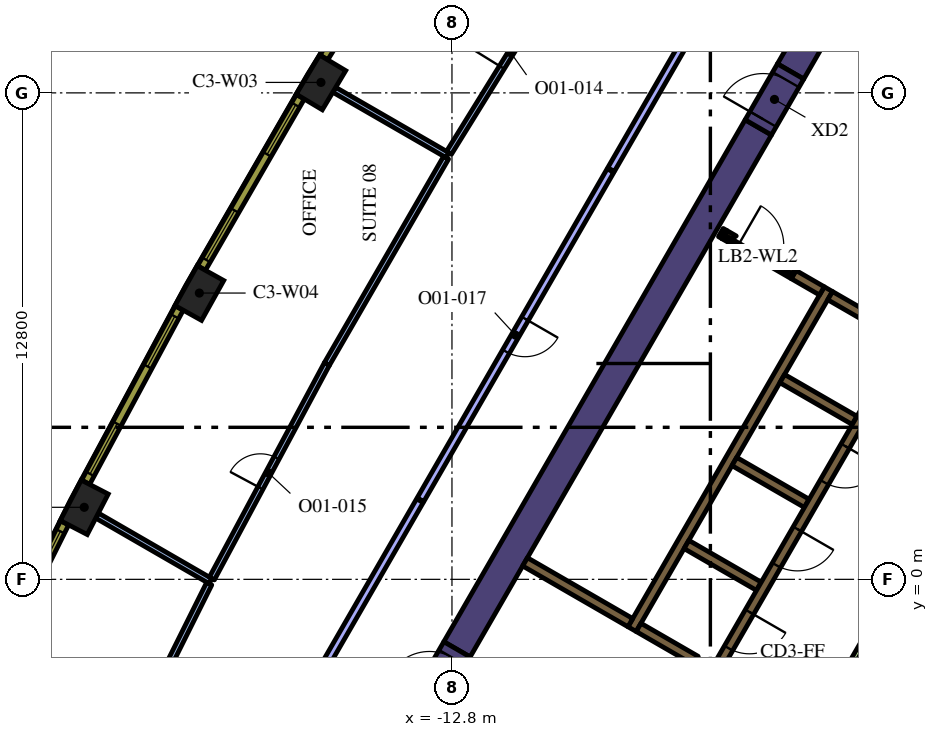
"""IFC4 building model, lengths in metres.
Left out: names, types, materials, properties, quantities, classifications, styles, units other than length and angle.
Written with IfcOpenShell. Run it as: python <this file> out.ifc"""

import sys

from ifc_helpers import new_model, si_unit, direction, frame, frame_2d, origin, origin_2d, place, context, subcontext, project, spatial, polyline, rectangle, outline, extrude, element, fill, save


model = new_model("IFC4")
c1 = context("Model", 3, precision=1e-05, world=origin(), true_north=direction((0.0, 1.0)))
c2 = subcontext(c1, "Body", "Model", "MODEL_VIEW")
j1 = project(units=[si_unit("LENGTHUNIT", "METRE"), si_unit("PLANEANGLEUNIT", "RADIAN")], contexts=[c1])
p1 = place(None, origin())
s1 = spatial("IfcSite", under=j1, at=p1, CompositionType="ELEMENT")
p2 = place(p1, origin())
s2 = spatial("IfcBuilding", under=s1, at=p2, CompositionType="ELEMENT")
p3 = place(p2, frame((0.0, 0.0, 150.0)))
s3 = spatial("IfcBuildingStorey", under=s2, at=p3, CompositionType="ELEMENT", Elevation=150.0)
for number, where, z_axis, x_axis in (
    (1, (-16.247, 13.075, 0.0), (0.0, 0.0, 1.0), (-0.513, -0.858, 0.0)),
    (2, (-19.447, 7.533, 0.0), (0.0, 0.0, 1.0), (-0.487, -0.874, 0.0)),
    (3, (-22.476, 1.896, 0.0), (0.0, 0.0, 1.0), (-0.46, -0.888, 0.0)),
):
    element("IfcColumn", number, at=place(p3, frame(where, z_axis=z_axis, x_axis=x_axis)), inside=s3, PredefinedType="COLUMN", context=c2, shape_type="SweptSolid", body=[
        extrude(rectangle(XDim=1.2, YDim=0.8, at=origin_2d()), origin(), (0.0, 0.0, 1.0), 4.2),
    ])
p4 = place(p3, frame((-2.477, 15.81, 0.0), z_axis=(0.0, 0.0, 1.0), x_axis=(-0.499969377405, -0.866043083026, 0.0)))
e4 = element("IfcWall", 4, at=p4, inside=s3, PredefinedType="SOLIDWALL", context=c2, shape_type="SweptSolid", body=[
    extrude(rectangle(XDim=2.824, YDim=0.8, at=frame_2d((1.412, 0.0))), origin(), (0.0, 0.0, 1.0), 4.2),
])
p5 = place(p3, frame((-12.668, -1.842, 0.0), z_axis=(0.0, 0.0, 1.0), x_axis=(0.500003640647, 0.866023301845, 0.0)))
e5 = element("IfcWall", 5, at=p5, inside=s3, PredefinedType="SOLIDWALL", context=c2, shape_type="SweptSolid", body=[
    extrude(rectangle(XDim=15.858, YDim=0.8, at=frame_2d((7.929, 0.0))), origin(), (0.0, 0.0, 1.0), 4.2),
])
p6 = place(p3, frame((-8.06, -1.311, 0.0), z_axis=(0.0, 0.0, 1.0), x_axis=(0.50000273126, 0.866023826885, 0.0)))
e6 = element("IfcWall", 6, at=p6, inside=s3, PredefinedType="SOLIDWALL", context=c2, shape_type="SweptSolid", body=[
    extrude(rectangle(XDim=10.33, YDim=0.25, at=frame_2d((5.165, 0.0))), origin(), (0.0, 0.0, 1.0), 4.2),
])
p7 = place(p3, origin())
e7 = element("IfcWall", 7, at=p7, inside=s3, PredefinedType="SOLIDWALL", context=c2, shape_type="SweptSolid", body=[
    extrude(outline(polyline([(-2.912, 7.356), (-2.787, 7.573), (-1.232, 6.675), (-1.303, 6.675), (-1.304, 6.675), (-1.304, 6.675), (-1.304, 6.525), (-1.304, 6.525), (-1.303, 6.525), (-0.971, 6.525), (-0.665, 6.348), (-0.79, 6.132), (-1.007, 6.257), (-1.007, 6.257), (-2.912, 7.356)])), origin(), (0.0, 0.0, 1.0), 4.2),
])
for number, where, z_axis, x_axis in (
    (8, (-2.204, 4.182, 0.0), (0.0, 0.0, 1.0), (-0.866, 0.5, 0.0)),
    (9, (-5.369, 3.1, 0.0), (0.0, 0.0, 1.0), (0.866, -0.5, 0.0)),
    (10, (-4.724, -0.182, 0.0), (0.0, 0.0, 1.0), (-0.866, 0.5, 0.0)),
):
    element("IfcWall", number, at=place(p3, frame(where, z_axis=z_axis, x_axis=x_axis)), inside=s3, PredefinedType="SOLIDWALL", context=c2, shape_type="SweptSolid", body=[
        extrude(rectangle(XDim=2.2, YDim=0.25, at=frame_2d((1.1, 0.0))), origin(), (0.0, 0.0, 1.0), 4.2),
    ])
p8 = place(p3, frame((-7.889, -1.265, 0.0), z_axis=(0.0, 0.0, 1.0), x_axis=(0.865986741702, -0.500066958712, 0.0)))
e11 = element("IfcWall", 11, at=p8, inside=s3, PredefinedType="SOLIDWALL", context=c2, shape_type="SweptSolid", body=[
    extrude(rectangle(XDim=1.738, YDim=0.25, at=frame_2d((0.869, 0.0))), origin(), (0.0, 0.0, 1.0), 4.2),
])
p9 = place(p3, frame((-8.106, -1.14, 0.0), z_axis=(0.0, 0.0, 1.0), x_axis=(-0.866008981251, 0.500028443584, 0.0)))
e12 = element("IfcWall", 12, at=p9, inside=s3, PredefinedType="SOLIDWALL", context=c2, shape_type="SweptSolid", body=[
    extrude(rectangle(XDim=3.2, YDim=0.25, at=frame_2d((1.6, 0.0))), origin(), (0.0, 0.0, 1.0), 4.2),
])
p10 = place(p3, frame((-5.725, 9.125, 0.0), z_axis=(0.0, 0.0, 1.0), x_axis=(0.866185586049, -0.49972245349, 0.0)))
e13 = element("IfcWall", 13, at=p10, inside=s3, PredefinedType="SOLIDWALL", context=c2, shape_type="SweptSolid", body=[
    extrude(rectangle(XDim=0.11, YDim=0.25, at=frame_2d((0.055, 0.0))), origin(), (0.0, 0.0, 1.0), 4.2),
])
p11 = place(p3, frame((-3.066, 7.59, 0.0), z_axis=(0.0, 0.0, 1.0), x_axis=(-0.866081358704, 0.49990307071, 0.0)))
e14 = element("IfcWall", 14, at=p11, inside=s3, PredefinedType="SOLIDWALL", context=c2, shape_type="SweptSolid", body=[
    extrude(rectangle(XDim=0.858, YDim=0.25, at=frame_2d((0.429, 0.0))), origin(), (0.0, 0.0, 1.0), 4.2),
])
e15 = element("IfcWall", 15, at=p7, inside=s3, PredefinedType="SOLIDWALL", context=c2, shape_type="SweptSolid", body=[
    extrude(outline(polyline([(-3.748, 8.128), (-3.813, 8.015), (-4.027, 8.139), (-4.017, 8.156), (-4.008, 8.173), (-4.0, 8.192), (-3.995, 8.21), (-3.991, 8.23), (-3.99, 8.25), (-3.99, 8.268), (-3.748, 8.128)])), origin(), (0.0, 0.0, 1.0), 4.2),
])
e16 = element("IfcWall", 16, at=p7, inside=s3, PredefinedType="SOLIDWALL", context=c2, shape_type="SweptSolid", body=[
    extrude(outline(polyline([(-5.689, 8.96), (-5.69, 8.961), (-5.565, 9.177), (-5.319, 9.035), (-5.335, 9.026), (-5.351, 9.015), (-5.366, 9.002), (-5.379, 8.988), (-5.392, 8.972), (-5.402, 8.956), (-5.412, 8.939), (-5.629, 9.064), (-5.629, 9.064), (-5.689, 8.96)])), origin(), (0.0, 0.0, 1.0), 4.2),
])
p12 = place(p3, frame((-3.147, -3.718, 0.0), z_axis=(0.0, 0.0, 1.0), x_axis=(0.500010131483, 0.866019554291, 0.0)))
e17 = element("IfcWall", 17, at=p12, inside=s3, PredefinedType="PARTITIONING", context=c2, shape_type="SweptSolid", body=[
    extrude(rectangle(XDim=3.894, YDim=0.15, at=frame_2d((1.947, 0.0))), origin(), (0.0, 0.0, 1.0), 3.15),
])
p13 = place(p3, frame((-0.898, 6.194, 0.0), z_axis=(0.0, 0.0, 1.0), x_axis=(-0.499996202215, -0.866027596426, 0.0)))
e18 = element("IfcWall", 18, at=p13, inside=s3, PredefinedType="SOLIDWALL", context=c2, shape_type="SweptSolid", body=[
    extrude(rectangle(XDim=9.83, YDim=0.25, at=frame_2d((4.915, 0.0))), origin(), (0.0, 0.0, 1.0), 4.2),
])
p14 = place(p13, frame((0.585, 0.0, 0.0)))
e19 = element("IfcOpeningElement", 19, at=p14, cuts=e18, PredefinedType="OPENING", context=c2, shape_type="SweptSolid", body=[
    extrude(rectangle(XDim=1.1, YDim=2.1, at=frame_2d((0.55, 1.05))), frame((0.0, 0.135, 0.0), z_axis=(0.0, -1.0, 0.0), x_axis=(1.0, 0.0, 0.0)), (0.0, 0.0, 1.0), 0.27),
])
p15 = place(p13, frame((3.105, 0.0, 0.0)))
e20 = element("IfcOpeningElement", 20, at=p15, cuts=e18, PredefinedType="OPENING", context=c2, shape_type="SweptSolid", body=[
    extrude(rectangle(XDim=1.1, YDim=2.1, at=frame_2d((0.55, 1.05))), frame((0.0, 0.135, 0.0), z_axis=(0.0, -1.0, 0.0), x_axis=(1.0, 0.0, 0.0)), (0.0, 0.0, 1.0), 0.27),
])
p16 = place(p13, frame((5.625, 0.0, 0.0)))
e21 = element("IfcOpeningElement", 21, at=p16, cuts=e18, PredefinedType="OPENING", context=c2, shape_type="SweptSolid", body=[
    extrude(rectangle(XDim=1.1, YDim=2.1, at=frame_2d((0.55, 1.05))), frame((0.0, 0.135, 0.0), z_axis=(0.0, -1.0, 0.0), x_axis=(1.0, 0.0, 0.0)), (0.0, 0.0, 1.0), 0.27),
])
p17 = place(p13, frame((8.145, 0.0, 0.0)))
e22 = element("IfcOpeningElement", 22, at=p17, cuts=e18, PredefinedType="OPENING", context=c2, shape_type="SweptSolid", body=[
    extrude(rectangle(XDim=1.1, YDim=2.1, at=frame_2d((0.55, 1.05))), frame((0.0, 0.135, 0.0), z_axis=(0.0, -1.0, 0.0), x_axis=(1.0, 0.0, 0.0)), (0.0, 0.0, 1.0), 0.27),
])
p18 = place(p3, frame((-5.659, 9.012, 0.0), z_axis=(0.0, 0.0, 1.0), x_axis=(0.866009402589, -0.500027713859, 0.0)))
e23 = element("IfcWall", 23, at=p18, inside=s3, PredefinedType="PARTITIONING", context=c2, shape_type="SweptSolid", body=[
    extrude(rectangle(XDim=2.1, YDim=0.12, at=frame_2d((1.05, 0.0))), origin(), (0.0, 0.0, 1.0), 3.15),
])
p19 = place(p18, frame((0.45, 0.0, 0.0)))
e24 = element("IfcOpeningElement", 24, at=p19, cuts=e23, PredefinedType="OPENING", context=c2, shape_type="SweptSolid", body=[
    extrude(rectangle(XDim=1.2, YDim=2.1, at=frame_2d((0.6, 1.05))), frame((0.0, 0.07, 0.0), z_axis=(0.0, -1.0, 0.0), x_axis=(1.0, 0.0, 0.0)), (0.0, 0.0, 1.0), 0.14),
])
p20 = place(p3, frame((-4.739, 11.892, 0.0), z_axis=(0.0, 0.0, 1.0), x_axis=(0.500062241894, 0.865989465428, 0.0)))
e25 = element("IfcWall", 25, at=p20, inside=s3, PredefinedType="SOLIDWALL", context=c2, shape_type="SweptSolid", body=[
    extrude(rectangle(XDim=1.7, YDim=0.8, at=frame_2d((0.85, 0.0))), origin(), (0.0, 0.0, 1.0), 4.2),
])
p21 = place(p20, frame((0.25, 0.0, 0.0)))
e26 = element("IfcOpeningElement", 26, at=p21, cuts=e25, PredefinedType="OPENING", context=c2, shape_type="SweptSolid", body=[
    extrude(rectangle(XDim=1.2, YDim=2.1, at=frame_2d((0.6, 1.05))), frame((0.0, 0.41, 0.0), z_axis=(0.0, -1.0, 0.0), x_axis=(1.0, 0.0, 0.0)), (0.0, 0.0, 1.0), 0.82),
])
p22 = place(p3, frame((-13.518, -3.314, 0.0), z_axis=(0.0, 0.0, 1.0), x_axis=(0.500062241894, 0.865989465428, 0.0)))
e27 = element("IfcWall", 27, at=p22, inside=s3, PredefinedType="SOLIDWALL", context=c2, shape_type="SweptSolid", body=[
    extrude(rectangle(XDim=1.7, YDim=0.8, at=frame_2d((0.85, 0.0))), origin(), (0.0, 0.0, 1.0), 4.2),
])
p23 = place(p22, frame((0.25, 0.0, 0.0)))
e28 = element("IfcOpeningElement", 28, at=p23, cuts=e27, PredefinedType="OPENING", context=c2, shape_type="SweptSolid", body=[
    extrude(rectangle(XDim=1.2, YDim=2.1, at=frame_2d((0.6, 1.05))), frame((0.0, 0.41, 0.0), z_axis=(0.0, -1.0, 0.0), x_axis=(1.0, 0.0, 0.0)), (0.0, 0.0, 1.0), 0.82),
])
p24 = place(p3, frame((-12.917, 11.16, 0.0), z_axis=(0.0, 0.0, 1.0), x_axis=(-0.866039125629, 0.499976232315, 0.0)))
e29 = element("IfcWall", 29, at=p24, inside=s3, PredefinedType="PARTITIONING", context=c2, shape_type="SweptSolid", body=[
    extrude(rectangle(XDim=3.442, YDim=0.15, at=frame_2d((1.721, 0.0))), origin(), (0.0, 0.0, 1.0), 3.15),
])
p25 = place(p3, frame((-12.877, 11.224, 0.0), z_axis=(0.0, 0.0, 1.0), x_axis=(0.526202711334, 0.850359163286, 0.0)))
e30 = element("IfcWall", 30, at=p25, inside=s3, PredefinedType="PARTITIONING", context=c2, shape_type="SweptSolid", body=[
    extrude(rectangle(XDim=6.142, YDim=0.15, at=frame_2d((3.071, 0.0))), origin(), (0.0, 0.0, 1.0), 3.15),
])
p26 = place(p25, frame((2.642, 0.0, 0.0)))
e31 = element("IfcOpeningElement", 31, at=p26, cuts=e30, PredefinedType="OPENING", context=c2, shape_type="SweptSolid", body=[
    extrude(rectangle(XDim=0.9, YDim=2.1, at=frame_2d((0.45, 1.05))), frame((0.0, 0.085, 0.0), z_axis=(0.0, -1.0, 0.0), x_axis=(1.0, 0.0, 0.0)), (0.0, 0.0, 1.0), 0.17),
])
p27 = place(p3, frame((-19.154, -0.046, 0.0), z_axis=(0.0, 0.0, 1.0), x_axis=(-0.866051136095, 0.499955427682, 0.0)))
e32 = element("IfcWall", 32, at=p27, inside=s3, PredefinedType="PARTITIONING", context=c2, shape_type="SweptSolid", body=[
    extrude(rectangle(XDim=3.447, YDim=0.15, at=frame_2d((1.724, 0.0))), origin(), (0.0, 0.0, 1.0), 3.15),
])
p28 = place(p3, frame((-12.954, 11.095, 0.0), z_axis=(0.0, 0.0, 1.0), x_axis=(-0.500282785331, -0.865862076027, 0.0)))
e33 = element("IfcWall", 33, at=p28, inside=s3, PredefinedType="PARTITIONING", context=c2, shape_type="SweptSolid", body=[
    extrude(rectangle(XDim=6.273, YDim=0.15, at=frame_2d((3.136, 0.0))), origin(), (0.0, 0.0, 1.0), 3.15),
])
p29 = place(p3, frame((-19.118, 0.02, 0.0), z_axis=(0.0, 0.0, 1.0), x_axis=(0.47251230182, 0.88132407469, 0.0)))
e34 = element("IfcWall", 34, at=p29, inside=s3, PredefinedType="PARTITIONING", context=c2, shape_type="SweptSolid", body=[
    extrude(rectangle(XDim=6.404, YDim=0.15, at=frame_2d((3.202, 0.0))), origin(), (0.0, 0.0, 1.0), 3.15),
])
p30 = place(p29, frame((2.704, 0.0, 0.0)))
e35 = element("IfcOpeningElement", 35, at=p30, cuts=e34, PredefinedType="OPENING", context=c2, shape_type="SweptSolid", body=[
    extrude(rectangle(XDim=0.9, YDim=2.1, at=frame_2d((0.45, 1.05))), frame((0.0, 0.085, 0.0), z_axis=(0.0, -1.0, 0.0), x_axis=(1.0, 0.0, 0.0)), (0.0, 0.0, 1.0), 0.17),
])
p31 = place(p3, frame((-21.869, -5.493, 0.0), z_axis=(0.0, 0.0, 1.0), x_axis=(0.44618972677, 0.894938393257, 0.0)))
e36 = element("IfcWall", 36, at=p31, inside=s3, PredefinedType="PARTITIONING", context=c2, shape_type="SweptSolid", body=[
    extrude(rectangle(XDim=6.011, YDim=0.15, at=frame_2d((3.005, 0.0))), origin(), (0.0, 0.0, 1.0), 3.15),
])
p32 = place(p31, frame((2.511, 0.0, 0.0)))
e37 = element("IfcOpeningElement", 37, at=p32, cuts=e36, PredefinedType="OPENING", context=c2, shape_type="SweptSolid", body=[
    extrude(rectangle(XDim=0.9, YDim=2.1, at=frame_2d((0.45, 1.05))), frame((0.0, 0.085, 0.0), z_axis=(0.0, -1.0, 0.0), x_axis=(1.0, 0.0, 0.0)), (0.0, 0.0, 1.0), 0.17),
])
p33 = place(p3, frame((-8.628, 10.755, 0.0), z_axis=(0.0, 0.0, 1.0), x_axis=(-0.500004234368, -0.866022959057, 0.0)))
e38 = element("IfcWall", 38, at=p33, inside=s3, PredefinedType="PARTITIONING", context=c2, shape_type="SweptSolid", body=[
    extrude(rectangle(XDim=10.0, YDim=0.2, at=frame_2d((5.0, 0.0))), origin(), (0.0, 0.0, 1.0), 3.15),
])
p34 = place(p33, frame((4.5, 0.0, 0.0)))
e39 = element("IfcOpeningElement", 39, at=p34, cuts=e38, PredefinedType="OPENING", context=c2, shape_type="SweptSolid", body=[
    extrude(rectangle(XDim=1.0, YDim=2.1, at=frame_2d((0.5, 1.05))), frame((0.0, 0.11, 0.0), z_axis=(0.0, -1.0, 0.0), x_axis=(1.0, 0.0, 0.0)), (0.0, 0.0, 1.0), 0.22),
])
p35 = place(p3, frame((-13.643, 2.069, 0.0), z_axis=(0.0, 0.0, 1.0), x_axis=(-0.500012305324, -0.866018299186, 0.0)))
e40 = element("IfcWall", 40, at=p35, inside=s3, PredefinedType="PARTITIONING", context=c2, shape_type="SweptSolid", body=[
    extrude(rectangle(XDim=9.721, YDim=0.2, at=frame_2d((4.861, 0.0))), origin(), (0.0, 0.0, 1.0), 3.15),
])
p36 = place(p3, frame((-4.167, 18.483, 0.0), z_axis=(0.0, 0.0, 1.0), x_axis=(-0.499974340325, -0.866040217898, 0.0)))
e41 = element("IfcWall", 41, at=p36, inside=s3, PredefinedType="PARTITIONING", context=c2, shape_type="SweptSolid", body=[
    extrude(rectangle(XDim=8.894, YDim=0.2, at=frame_2d((4.447, 0.0))), origin(), (0.0, 0.0, 1.0), 3.15),
])
p37 = place(p3, frame((-13.433, 18.156, 0.0), z_axis=(0.0, 0.0, 1.0), x_axis=(-0.526197926587, -0.850362124072, 0.0)))
e42 = element("IfcWall", 42, at=p37, inside=s3, PredefinedType="SOLIDWALL", context=c2, shape_type="SweptSolid", body=[
    extrude(rectangle(XDim=5.203, YDim=0.24, at=frame_2d((2.602, 0.0))), origin(), (0.0, 0.0, 1.0), 3.95),
])
p38 = place(p37, frame((0.248, 0.0, 0.9)))
e43 = element("IfcOpeningElement", 43, at=p38, cuts=e42, PredefinedType="OPENING", context=c2, shape_type="SweptSolid", body=[
    extrude(rectangle(XDim=1.5, YDim=2.55, at=frame_2d((0.75, 1.275))), frame((0.0, 0.13, 0.0), z_axis=(0.0, -1.0, 0.0), x_axis=(1.0, 0.0, 0.0)), (0.0, 0.0, 1.0), 0.26),
])
p39 = place(p37, frame((3.455, 0.0, 0.9)))
e44 = element("IfcOpeningElement", 44, at=p39, cuts=e42, PredefinedType="OPENING", context=c2, shape_type="SweptSolid", body=[
    extrude(rectangle(XDim=1.5, YDim=2.55, at=frame_2d((0.75, 1.275))), frame((0.0, 0.13, 0.0), z_axis=(0.0, -1.0, 0.0), x_axis=(1.0, 0.0, 0.0)), (0.0, 0.0, 1.0), 0.26),
])
p40 = place(p3, frame((-16.789, 12.697, 0.0), z_axis=(0.0, 0.0, 1.0), x_axis=(-0.500009456303, -0.866019944116, 0.0)))
e45 = element("IfcWall", 45, at=p40, inside=s3, PredefinedType="SOLIDWALL", context=c2, shape_type="SweptSolid", body=[
    extrude(rectangle(XDim=5.204, YDim=0.24, at=frame_2d((2.602, 0.0))), origin(), (0.0, 0.0, 1.0), 3.95),
])
p41 = place(p40, frame((0.248, 0.0, 0.9)))
e46 = element("IfcOpeningElement", 46, at=p41, cuts=e45, PredefinedType="OPENING", context=c2, shape_type="SweptSolid", body=[
    extrude(rectangle(XDim=1.5, YDim=2.55, at=frame_2d((0.75, 1.275))), frame((0.0, 0.13, 0.0), z_axis=(0.0, -1.0, 0.0), x_axis=(1.0, 0.0, 0.0)), (0.0, 0.0, 1.0), 0.26),
])
p42 = place(p40, frame((3.455, 0.0, 0.9)))
e47 = element("IfcOpeningElement", 47, at=p42, cuts=e45, PredefinedType="OPENING", context=c2, shape_type="SweptSolid", body=[
    extrude(rectangle(XDim=1.5, YDim=2.55, at=frame_2d((0.75, 1.275))), frame((0.0, 0.13, 0.0), z_axis=(0.0, -1.0, 0.0), x_axis=(1.0, 0.0, 0.0)), (0.0, 0.0, 1.0), 0.26),
])
p43 = place(p3, frame((-19.977, 7.139, 0.0), z_axis=(0.0, 0.0, 1.0), x_axis=(-0.473349833294, -0.880874528704, 0.0)))
e48 = element("IfcWall", 48, at=p43, inside=s3, PredefinedType="SOLIDWALL", context=c2, shape_type="SweptSolid", body=[
    extrude(rectangle(XDim=5.204, YDim=0.24, at=frame_2d((2.602, 0.0))), origin(), (0.0, 0.0, 1.0), 3.95),
])
p44 = place(p43, frame((0.248, 0.0, 0.9)))
e49 = element("IfcOpeningElement", 49, at=p44, cuts=e48, PredefinedType="OPENING", context=c2, shape_type="SweptSolid", body=[
    extrude(rectangle(XDim=1.5, YDim=2.55, at=frame_2d((0.75, 1.275))), frame((0.0, 0.13, 0.0), z_axis=(0.0, -1.0, 0.0), x_axis=(1.0, 0.0, 0.0)), (0.0, 0.0, 1.0), 0.26),
])
p45 = place(p43, frame((3.455, 0.0, 0.9)))
e50 = element("IfcOpeningElement", 50, at=p45, cuts=e48, PredefinedType="OPENING", context=c2, shape_type="SweptSolid", body=[
    extrude(rectangle(XDim=1.5, YDim=2.55, at=frame_2d((0.75, 1.275))), frame((0.0, 0.13, 0.0), z_axis=(0.0, -1.0, 0.0), x_axis=(1.0, 0.0, 0.0)), (0.0, 0.0, 1.0), 0.26),
])
p46 = place(p3, frame((-22.994, 1.485, 0.0), z_axis=(0.0, 0.0, 1.0), x_axis=(-0.446256171312, -0.8949052629, 0.0)))
e51 = element("IfcWall", 51, at=p46, inside=s3, PredefinedType="SOLIDWALL", context=c2, shape_type="SweptSolid", body=[
    extrude(rectangle(XDim=5.203, YDim=0.24, at=frame_2d((2.602, 0.0))), origin(), (0.0, 0.0, 1.0), 3.95),
])
p47 = place(p46, frame((0.248, 0.0, 0.9)))
e52 = element("IfcOpeningElement", 52, at=p47, cuts=e51, PredefinedType="OPENING", context=c2, shape_type="SweptSolid", body=[
    extrude(rectangle(XDim=1.5, YDim=2.55, at=frame_2d((0.75, 1.275))), frame((0.0, 0.13, 0.0), z_axis=(0.0, -1.0, 0.0), x_axis=(1.0, 0.0, 0.0)), (0.0, 0.0, 1.0), 0.26),
])
p48 = place(p46, frame((3.455, 0.0, 0.9)))
e53 = element("IfcOpeningElement", 53, at=p48, cuts=e51, PredefinedType="OPENING", context=c2, shape_type="SweptSolid", body=[
    extrude(rectangle(XDim=1.5, YDim=2.55, at=frame_2d((0.75, 1.275))), frame((0.0, 0.13, 0.0), z_axis=(0.0, -1.0, 0.0), x_axis=(1.0, 0.0, 0.0)), (0.0, 0.0, 1.0), 0.26),
])
p49 = place(p15, origin())
e54 = element("IfcDoor", 54, at=p49, inside=s3, OperationType="DOUBLE_DOOR_SLIDING", PredefinedType="DOOR", context=c2, shape_type="SweptSolid", body=[
    extrude(rectangle(XDim=1.1, YDim=2.1, at=frame_2d((0.55, 1.05))), frame((0.0, 0.025, 0.0), z_axis=(0.0, -1.0, 0.0), x_axis=(1.0, 0.0, 0.0)), (0.0, 0.0, 1.0), 0.05),
])
fill(e20, e54)
p50 = place(p16, origin())
e55 = element("IfcDoor", 55, at=p50, inside=s3, OperationType="DOUBLE_DOOR_SLIDING", PredefinedType="DOOR", context=c2, shape_type="SweptSolid", body=[
    extrude(rectangle(XDim=1.1, YDim=2.1, at=frame_2d((0.55, 1.05))), frame((0.0, 0.025, 0.0), z_axis=(0.0, -1.0, 0.0), x_axis=(1.0, 0.0, 0.0)), (0.0, 0.0, 1.0), 0.05),
])
fill(e21, e55)
p51 = place(p17, origin())
e56 = element("IfcDoor", 56, at=p51, inside=s3, OperationType="DOUBLE_DOOR_SLIDING", PredefinedType="DOOR", context=c2, shape_type="SweptSolid", body=[
    extrude(rectangle(XDim=1.1, YDim=2.1, at=frame_2d((0.55, 1.05))), frame((0.0, 0.025, 0.0), z_axis=(0.0, -1.0, 0.0), x_axis=(1.0, 0.0, 0.0)), (0.0, 0.0, 1.0), 0.05),
])
fill(e22, e56)
p52 = place(p19, origin())
e57 = element("IfcDoor", 57, at=p52, inside=s3, OperationType="SINGLE_SWING_LEFT", PredefinedType="DOOR", context=c2, shape_type="SweptSolid", body=[
    extrude(rectangle(XDim=1.2, YDim=2.1, at=frame_2d((0.6, 1.05))), frame((0.0, 0.025, 0.0), z_axis=(0.0, -1.0, 0.0), x_axis=(1.0, 0.0, 0.0)), (0.0, 0.0, 1.0), 0.05),
])
fill(e24, e57)
p53 = place(p21, origin())
e58 = element("IfcDoor", 58, at=p53, inside=s3, OperationType="SINGLE_SWING_LEFT", PredefinedType="DOOR", context=c2, shape_type="SweptSolid", body=[
    extrude(rectangle(XDim=1.2, YDim=2.1, at=frame_2d((0.6, 1.05))), frame((0.0, 0.025, 0.0), z_axis=(0.0, -1.0, 0.0), x_axis=(1.0, 0.0, 0.0)), (0.0, 0.0, 1.0), 0.05),
])
fill(e26, e58)
p54 = place(p26, origin())
e59 = element("IfcDoor", 59, at=p54, inside=s3, OperationType="SINGLE_SWING_RIGHT", PredefinedType="DOOR", context=c2, shape_type="SweptSolid", body=[
    extrude(rectangle(XDim=0.9, YDim=2.1, at=frame_2d((0.45, 1.05))), frame((0.0, 0.025, 0.0), z_axis=(0.0, -1.0, 0.0), x_axis=(1.0, 0.0, 0.0)), (0.0, 0.0, 1.0), 0.05),
])
fill(e31, e59)
p55 = place(p30, origin())
e60 = element("IfcDoor", 60, at=p55, inside=s3, OperationType="SINGLE_SWING_LEFT", PredefinedType="DOOR", context=c2, shape_type="SweptSolid", body=[
    extrude(rectangle(XDim=0.9, YDim=2.1, at=frame_2d((0.45, 1.05))), frame((0.0, 0.025, 0.0), z_axis=(0.0, -1.0, 0.0), x_axis=(1.0, 0.0, 0.0)), (0.0, 0.0, 1.0), 0.05),
])
fill(e35, e60)
p56 = place(p34, origin())
e61 = element("IfcDoor", 61, at=p56, inside=s3, OperationType="SINGLE_SWING_LEFT", PredefinedType="DOOR", context=c2, shape_type="SweptSolid", body=[
    extrude(rectangle(XDim=1.0, YDim=2.1, at=frame_2d((0.5, 1.05))), frame((0.0, 0.025, 0.0), z_axis=(0.0, -1.0, 0.0), x_axis=(1.0, 0.0, 0.0)), (0.0, 0.0, 1.0), 0.05),
])
fill(e39, e61)
p57 = place(p41, origin())
e62 = element("IfcWindow", 62, at=p57, inside=s3, PartitioningType="SINGLE_PANEL", PredefinedType="WINDOW", context=c2, shape_type="SweptSolid", body=[
    extrude(rectangle(XDim=1.5, YDim=2.55, at=frame_2d((0.75, 1.275))), frame((0.0, 0.04, 0.0), z_axis=(0.0, -1.0, 0.0), x_axis=(1.0, 0.0, 0.0)), (0.0, 0.0, 1.0), 0.06),
])
fill(e46, e62)
p58 = place(p42, origin())
e63 = element("IfcWindow", 63, at=p58, inside=s3, PartitioningType="SINGLE_PANEL", PredefinedType="WINDOW", context=c2, shape_type="SweptSolid", body=[
    extrude(rectangle(XDim=1.5, YDim=2.55, at=frame_2d((0.75, 1.275))), frame((0.0, 0.04, 0.0), z_axis=(0.0, -1.0, 0.0), x_axis=(1.0, 0.0, 0.0)), (0.0, 0.0, 1.0), 0.06),
])
fill(e47, e63)
p59 = place(p44, origin())
e64 = element("IfcWindow", 64, at=p59, inside=s3, PartitioningType="SINGLE_PANEL", PredefinedType="WINDOW", context=c2, shape_type="SweptSolid", body=[
    extrude(rectangle(XDim=1.5, YDim=2.55, at=frame_2d((0.75, 1.275))), frame((0.0, 0.04, 0.0), z_axis=(0.0, -1.0, 0.0), x_axis=(1.0, 0.0, 0.0)), (0.0, 0.0, 1.0), 0.06),
])
fill(e49, e64)
p60 = place(p45, origin())
e65 = element("IfcWindow", 65, at=p60, inside=s3, PartitioningType="SINGLE_PANEL", PredefinedType="WINDOW", context=c2, shape_type="SweptSolid", body=[
    extrude(rectangle(XDim=1.5, YDim=2.55, at=frame_2d((0.75, 1.275))), frame((0.0, 0.04, 0.0), z_axis=(0.0, -1.0, 0.0), x_axis=(1.0, 0.0, 0.0)), (0.0, 0.0, 1.0), 0.06),
])
fill(e50, e65)
p61 = place(p47, origin())
e66 = element("IfcWindow", 66, at=p61, inside=s3, PartitioningType="SINGLE_PANEL", PredefinedType="WINDOW", context=c2, shape_type="SweptSolid", body=[
    extrude(rectangle(XDim=1.5, YDim=2.55, at=frame_2d((0.75, 1.275))), frame((0.0, 0.04, 0.0), z_axis=(0.0, -1.0, 0.0), x_axis=(1.0, 0.0, 0.0)), (0.0, 0.0, 1.0), 0.06),
])
fill(e52, e66)
save(model, sys.argv[1])
